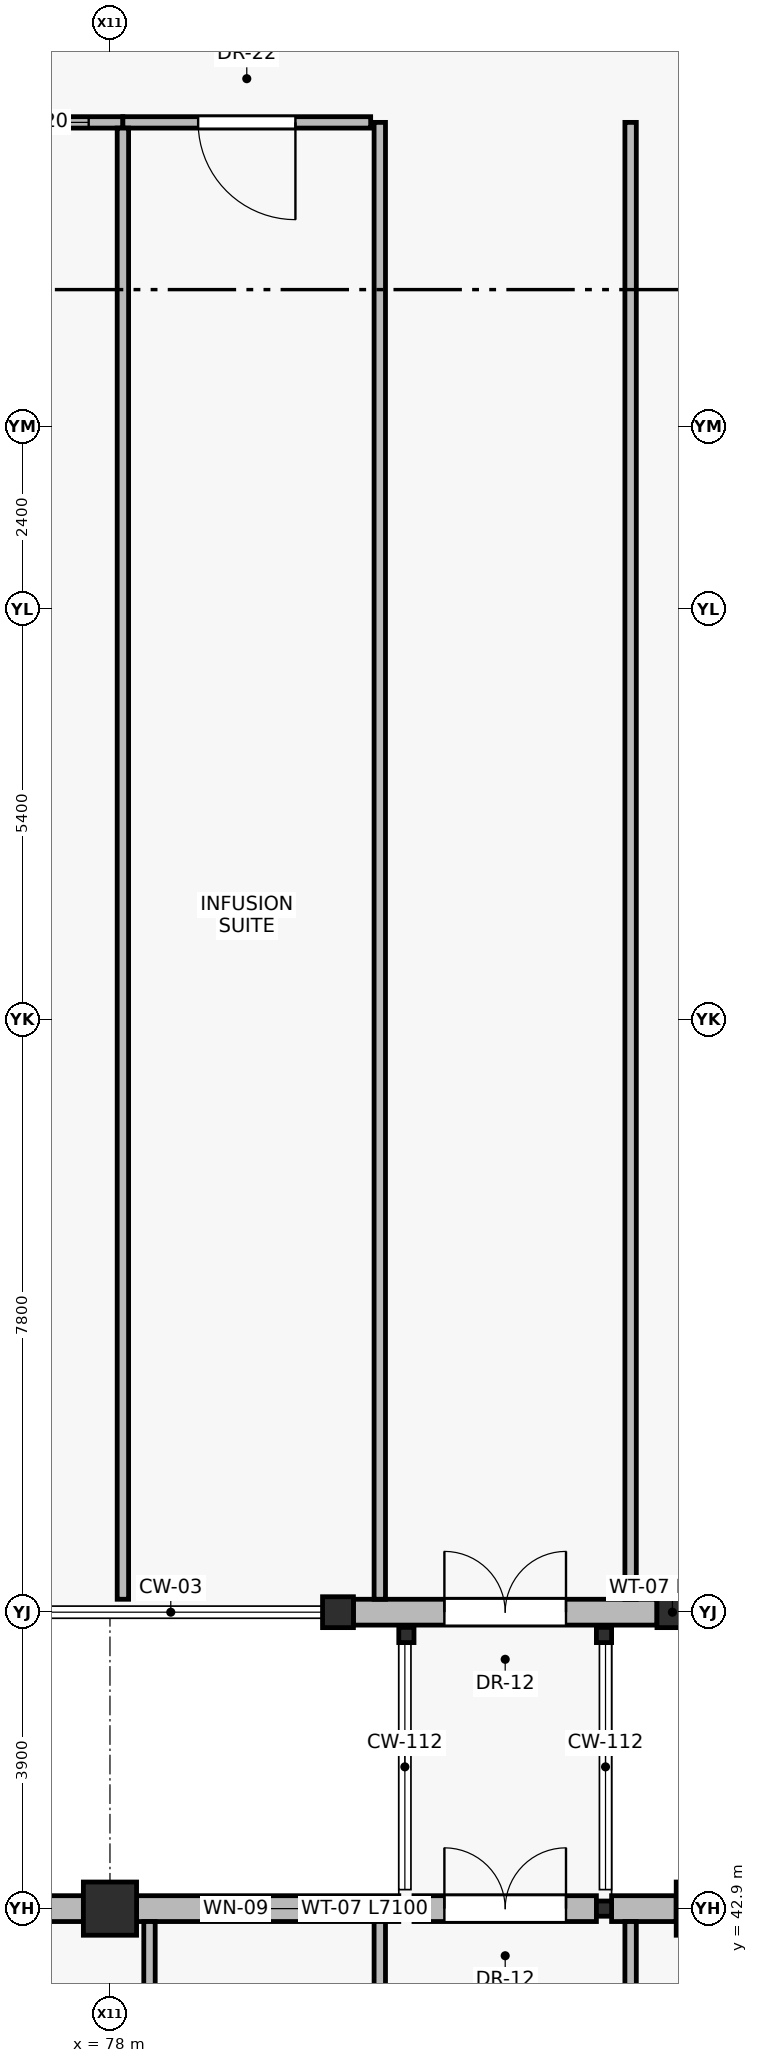
"""IFC4 building model, lengths in metres.
Left out: names, types, materials, properties, quantities, classifications, styles, units other than length and angle.
Written with IfcOpenShell. Run it as: python <this file> out.ifc"""

import sys

from ifc_helpers import new_model, si_unit, direction, frame, frame_2d, origin, origin_2d, place, context, subcontext, project, spatial, rectangle, hollow_rectangle, hollow_circle, extrude, element, fill, save


model = new_model("IFC4")
c1 = context("Model", 3, precision=1e-05, world=origin(), true_north=direction((0.0, 1.0)))
c2 = subcontext(c1, "Body", "Model", "MODEL_VIEW")
j1 = project(units=[si_unit("LENGTHUNIT", "METRE"), si_unit("PLANEANGLEUNIT", "RADIAN")], contexts=[c1])
p1 = place(None, origin())
s1 = spatial("IfcSite", under=j1, at=p1, CompositionType="ELEMENT")
p2 = place(p1, origin())
s2 = spatial("IfcBuilding", under=s1, at=p2, CompositionType="ELEMENT")
p3 = place(p2, origin())
s3 = spatial("IfcBuildingStorey", under=s2, at=p3, CompositionType="ELEMENT", Elevation=0.0)
for number, where, z_axis, x_axis in (
    (1, (81.0, 46.8, 0.0), (0.0, 0.0, 1.0), (1.0, 0.0, 0.0)),
    (2, (85.4, 46.8, 0.0), (0.0, 0.0, 1.0), (1.0, 0.0, 0.0)),
):
    element("IfcColumn", number, at=place(p3, frame(where, z_axis=z_axis, x_axis=x_axis)), inside=s3, PredefinedType="COLUMN", context=c2, shape_type="SweptSolid", body=[
        extrude(hollow_circle(Radius=0.203, WallThickness=0.016, at=origin_2d()), origin(), (0.0, 0.0, 1.0), 4.8),
    ])
for number, where, z_axis, x_axis in (
    (3, (78.0, 42.9, 0.0), (0.0, 0.0, 1.0), (1.0, 0.0, 0.0)),
    (4, (85.8, 42.9, 0.0), (0.0, 0.0, 1.0), (1.0, 0.0, 0.0)),
):
    element("IfcColumn", number, at=place(p3, frame(where, z_axis=z_axis, x_axis=x_axis)), inside=s3, PredefinedType="COLUMN", context=c2, shape_type="SweptSolid", body=[
        extrude(rectangle(XDim=0.7, YDim=0.7, at=origin_2d()), origin(), (0.0, 0.0, 1.0), 4.8),
    ])
for number, where, z_axis, x_axis in (
    (5, (81.9, 42.9, 0.0), (0.0, 0.0, 1.0), (1.0, 0.0, 0.0)),
    (6, (84.5, 42.9, 0.0), (0.0, 0.0, 1.0), (1.0, 0.0, 0.0)),
    (7, (81.9, 46.5, 0.0), (0.0, 0.0, 1.0), (1.0, 0.0, 0.0)),
    (8, (84.5, 46.5, 0.0), (0.0, 0.0, 1.0), (1.0, 0.0, 0.0)),
):
    element("IfcColumn", number, at=place(p3, frame(where, z_axis=z_axis, x_axis=x_axis)), inside=s3, PredefinedType="COLUMN", context=c2, shape_type="SweptSolid", body=[
        extrude(hollow_rectangle(XDim=0.2, YDim=0.2, WallThickness=0.01, at=origin_2d()), origin(), (0.0, 0.0, 1.0), 4.8),
    ])
p4 = place(p3, frame((85.197, 46.8, 0.0), z_axis=(0.0, 0.0, 1.0), x_axis=(-1.0, 0.0, 0.0)))
e9 = element("IfcWall", 9, at=p4, inside=s3, PredefinedType="STANDARD", context=c2, shape_type="SweptSolid", body=[
    extrude(rectangle(XDim=3.994, YDim=0.34, at=frame_2d((1.997, 0.0))), origin(), (0.0, 0.0, 1.0), 4.26),
])
p5 = place(p4, frame((1.197, 0.0, 0.0)))
e10 = element("IfcOpeningElement", 10, at=p5, cuts=e9, PredefinedType="OPENING", context=c2, shape_type="SweptSolid", body=[
    extrude(rectangle(XDim=1.6, YDim=2.2, at=frame_2d((0.8, 1.1))), frame((0.0, 0.18, 0.0), z_axis=(0.0, -1.0, 0.0), x_axis=(1.0, 0.0, 0.0)), (0.0, 0.0, 1.0), 0.36),
])
p6 = place(p3, frame((70.55, 42.9, 0.0), z_axis=(0.0, 0.0, 1.0), x_axis=(1.0, 0.0, 0.0)))
e11 = element("IfcWall", 11, at=p6, inside=s3, PredefinedType="STANDARD", context=c2, shape_type="SweptSolid", body=[
    extrude(rectangle(XDim=7.1, YDim=0.34, at=frame_2d((3.55, 0.0))), origin(), (0.0, 0.0, 1.0), 4.14),
])
p7 = place(p6, frame((0.12, 0.0, 0.0)))
e12 = element("IfcOpeningElement", 12, at=p7, cuts=e11, PredefinedType="OPENING", context=c2, shape_type="SweptSolid", body=[
    extrude(rectangle(XDim=1.8, YDim=2.25, at=frame_2d((0.9, 1.125))), frame((0.0, 0.18, 0.0), z_axis=(0.0, -1.0, 0.0), x_axis=(1.0, 0.0, 0.0)), (0.0, 0.0, 1.0), 0.36),
])
p8 = place(p3, frame((78.35, 42.9, 0.0), z_axis=(0.0, 0.0, 1.0), x_axis=(1.0, 0.0, 0.0)))
e13 = element("IfcWall", 13, at=p8, inside=s3, PredefinedType="STANDARD", context=c2, shape_type="SweptSolid", body=[
    extrude(rectangle(XDim=3.45, YDim=0.34, at=frame_2d((1.725, 0.0))), origin(), (0.0, 0.0, 1.0), 4.14),
])
p9 = place(p8, frame((0.875, 0.0, 0.9)))
e14 = element("IfcOpeningElement", 14, at=p9, cuts=e13, PredefinedType="OPENING", context=c2, shape_type="SweptSolid", body=[
    extrude(rectangle(XDim=1.5, YDim=1.85, at=frame_2d((0.75, 0.925))), frame((0.0, 0.18, 0.0), z_axis=(0.0, -1.0, 0.0), x_axis=(1.0, 0.0, 0.0)), (0.0, 0.0, 1.0), 0.36),
])
p10 = place(p3, frame((82.0, 42.9, 0.0), z_axis=(0.0, 0.0, 1.0), x_axis=(1.0, 0.0, 0.0)))
e15 = element("IfcWall", 15, at=p10, inside=s3, PredefinedType="STANDARD", context=c2, shape_type="SweptSolid", body=[
    extrude(rectangle(XDim=2.4, YDim=0.34, at=frame_2d((1.2, 0.0))), origin(), (0.0, 0.0, 1.0), 4.14),
])
p11 = place(p10, frame((0.4, 0.0, 0.0)))
e16 = element("IfcOpeningElement", 16, at=p11, cuts=e15, PredefinedType="OPENING", context=c2, shape_type="SweptSolid", body=[
    extrude(rectangle(XDim=1.6, YDim=2.2, at=frame_2d((0.8, 1.1))), frame((0.0, 0.18, 0.0), z_axis=(0.0, -1.0, 0.0), x_axis=(1.0, 0.0, 0.0)), (0.0, 0.0, 1.0), 0.36),
])
p12 = place(p3, frame((84.6, 42.9, 0.0), z_axis=(0.0, 0.0, 1.0), x_axis=(1.0, 0.0, 0.0)))
e17 = element("IfcWall", 17, at=p12, inside=s3, PredefinedType="STANDARD", context=c2, shape_type="SweptSolid", body=[
    extrude(rectangle(XDim=0.85, YDim=0.34, at=frame_2d((0.425, 0.0))), origin(), (0.0, 0.0, 1.0), 4.14),
])
for number, where, z_axis, x_axis in (
    (18, (81.55, 46.97, 0.0), (0.0, 0.0, 1.0), (0.0, 1.0, 0.0)),
    (19, (84.85, 46.97, 0.0), (0.0, 0.0, 1.0), (0.0, 1.0, 0.0)),
):
    element("IfcWall", number, at=place(p3, frame(where, z_axis=z_axis, x_axis=x_axis)), inside=s3, PredefinedType="PARTITIONING", context=c2, shape_type="SweptSolid", body=[
        extrude(rectangle(XDim=19.43, YDim=0.15, at=frame_2d((9.715, 0.0))), origin(), (0.0, 0.0, 1.0), 4.54),
    ])
for number, where, z_axis, x_axis in (
    (20, (81.55, 34.6, 0.0), (0.0, 0.0, 1.0), (0.0, 1.0, 0.0)),
    (21, (84.85, 34.6, 0.0), (0.0, 0.0, 1.0), (0.0, 1.0, 0.0)),
):
    element("IfcWall", number, at=place(p3, frame(where, z_axis=z_axis, x_axis=x_axis)), inside=s3, PredefinedType="PARTITIONING", context=c2, shape_type="SweptSolid", body=[
        extrude(rectangle(XDim=8.13, YDim=0.15, at=frame_2d((4.065, 0.0))), origin(), (0.0, 0.0, 1.0), 4.54),
    ])
p13 = place(p3, frame((78.17, 66.4, 0.0), z_axis=(0.0, 0.0, 1.0), x_axis=(-1.0, 0.0, 0.0)))
e22 = element("IfcWall", 22, at=p13, inside=s3, PredefinedType="PARTITIONING", context=c2, shape_type="SweptSolid", body=[
    extrude(rectangle(XDim=23.367, YDim=0.15, at=frame_2d((11.683, 0.0))), origin(), (0.0, 0.0, 1.0), 4.54),
])
p14 = place(p13, frame((10.9, 0.0, 0.0)))
e23 = element("IfcOpeningElement", 23, at=p14, cuts=e22, PredefinedType="OPENING", context=c2, shape_type="SweptSolid", body=[
    extrude(rectangle(XDim=1.6, YDim=2.2, at=frame_2d((0.8, 1.1))), frame((0.0, 0.085, 0.0), z_axis=(0.0, -1.0, 0.0), x_axis=(1.0, 0.0, 0.0)), (0.0, 0.0, 1.0), 0.17),
])
p15 = place(p13, frame((0.45, 0.0, 1.05)))
e24 = element("IfcOpeningElement", 24, at=p15, cuts=e22, PredefinedType="OPENING", context=c2, shape_type="SweptSolid", body=[
    extrude(rectangle(XDim=1.4, YDim=1.2, at=frame_2d((0.7, 0.6))), frame((0.0, 0.085, 0.0), z_axis=(0.0, -1.0, 0.0), x_axis=(1.0, 0.0, 0.0)), (0.0, 0.0, 1.0), 0.17),
])
p16 = place(p3, frame((81.43, 66.4, 0.0), z_axis=(0.0, 0.0, 1.0), x_axis=(-1.0, 0.0, 0.0)))
e25 = element("IfcWall", 25, at=p16, inside=s3, PredefinedType="PARTITIONING", context=c2, shape_type="SweptSolid", body=[
    extrude(rectangle(XDim=3.26, YDim=0.15, at=frame_2d((1.63, 0.0))), origin(), (0.0, 0.0, 1.0), 4.54),
])
p17 = place(p16, frame((0.99, 0.0, 0.0)))
e26 = element("IfcOpeningElement", 26, at=p17, cuts=e25, PredefinedType="OPENING", context=c2, shape_type="SweptSolid", body=[
    extrude(rectangle(XDim=1.28, YDim=2.25, at=frame_2d((0.64, 1.125))), frame((0.0, 0.085, 0.0), z_axis=(0.0, -1.0, 0.0), x_axis=(1.0, 0.0, 0.0)), (0.0, 0.0, 1.0), 0.17),
])
p18 = place(p3, frame((78.17, 46.97, 0.0), z_axis=(0.0, 0.0, 1.0), x_axis=(0.0, 1.0, 0.0)))
e27 = element("IfcWall", 27, at=p18, inside=s3, PredefinedType="PARTITIONING", context=c2, shape_type="SweptSolid", body=[
    extrude(rectangle(XDim=19.355, YDim=0.15, at=frame_2d((9.677, 0.0))), origin(), (0.0, 0.0, 1.0), 4.54),
])
p19 = place(p3, frame((78.52, 34.675, 0.0), z_axis=(0.0, 0.0, 1.0), x_axis=(0.0, 1.0, 0.0)))
e28 = element("IfcWall", 28, at=p19, inside=s3, PredefinedType="PARTITIONING", context=c2, shape_type="SweptSolid", body=[
    extrude(rectangle(XDim=8.055, YDim=0.15, at=frame_2d((4.027, 0.0))), origin(), (0.0, 0.0, 1.0), 4.54),
])
p20 = place(p5, frame((1.6, 0.0, 0.0), z_axis=(0.0, 0.0, 1.0), x_axis=(-1.0, 0.0, 0.0)))
e29 = element("IfcDoor", 29, at=p20, inside=s3, OperationType="DOUBLE_DOOR_SINGLE_SWING", PredefinedType="DOOR", context=c2, shape_type="SweptSolid", body=[
    extrude(rectangle(XDim=1.6, YDim=2.2, at=frame_2d((0.8, 1.1))), frame((0.0, 0.025, 0.0), z_axis=(0.0, -1.0, 0.0), x_axis=(1.0, 0.0, 0.0)), (0.0, 0.0, 1.0), 0.05),
])
fill(e10, e29)
p21 = place(p9, origin())
e30 = element("IfcWindow", 30, at=p21, inside=s3, PartitioningType="SINGLE_PANEL", PredefinedType="WINDOW", context=c2, shape_type="SweptSolid", body=[
    extrude(rectangle(XDim=1.5, YDim=1.85, at=frame_2d((0.75, 0.925))), frame((0.0, 0.03, 0.0), z_axis=(0.0, -1.0, 0.0), x_axis=(1.0, 0.0, 0.0)), (0.0, 0.0, 1.0), 0.06),
])
fill(e14, e30)
p22 = place(p11, origin())
e31 = element("IfcDoor", 31, at=p22, inside=s3, OperationType="DOUBLE_DOOR_SINGLE_SWING", PredefinedType="DOOR", context=c2, shape_type="SweptSolid", body=[
    extrude(rectangle(XDim=1.6, YDim=2.2, at=frame_2d((0.8, 1.1))), frame((0.0, 0.025, 0.0), z_axis=(0.0, -1.0, 0.0), x_axis=(1.0, 0.0, 0.0)), (0.0, 0.0, 1.0), 0.05),
])
fill(e16, e31)
p23 = place(p15, origin())
e32 = element("IfcWindow", 32, at=p23, inside=s3, PartitioningType="SINGLE_PANEL", PredefinedType="WINDOW", context=c2, shape_type="SweptSolid", body=[
    extrude(rectangle(XDim=1.4, YDim=1.2, at=frame_2d((0.7, 0.6))), frame((0.0, 0.03, 0.0), z_axis=(0.0, -1.0, 0.0), x_axis=(1.0, 0.0, 0.0)), (0.0, 0.0, 1.0), 0.06),
])
fill(e24, e32)
p24 = place(p17, origin())
e33 = element("IfcDoor", 33, at=p24, inside=s3, OperationType="SINGLE_SWING_LEFT", PredefinedType="DOOR", context=c2, shape_type="SweptSolid", body=[
    extrude(rectangle(XDim=1.28, YDim=2.25, at=frame_2d((0.64, 1.125))), frame((0.0, 0.025, 0.0), z_axis=(0.0, -1.0, 0.0), x_axis=(1.0, 0.0, 0.0)), (0.0, 0.0, 1.0), 0.05),
])
fill(e26, e33)
save(model, sys.argv[1])
